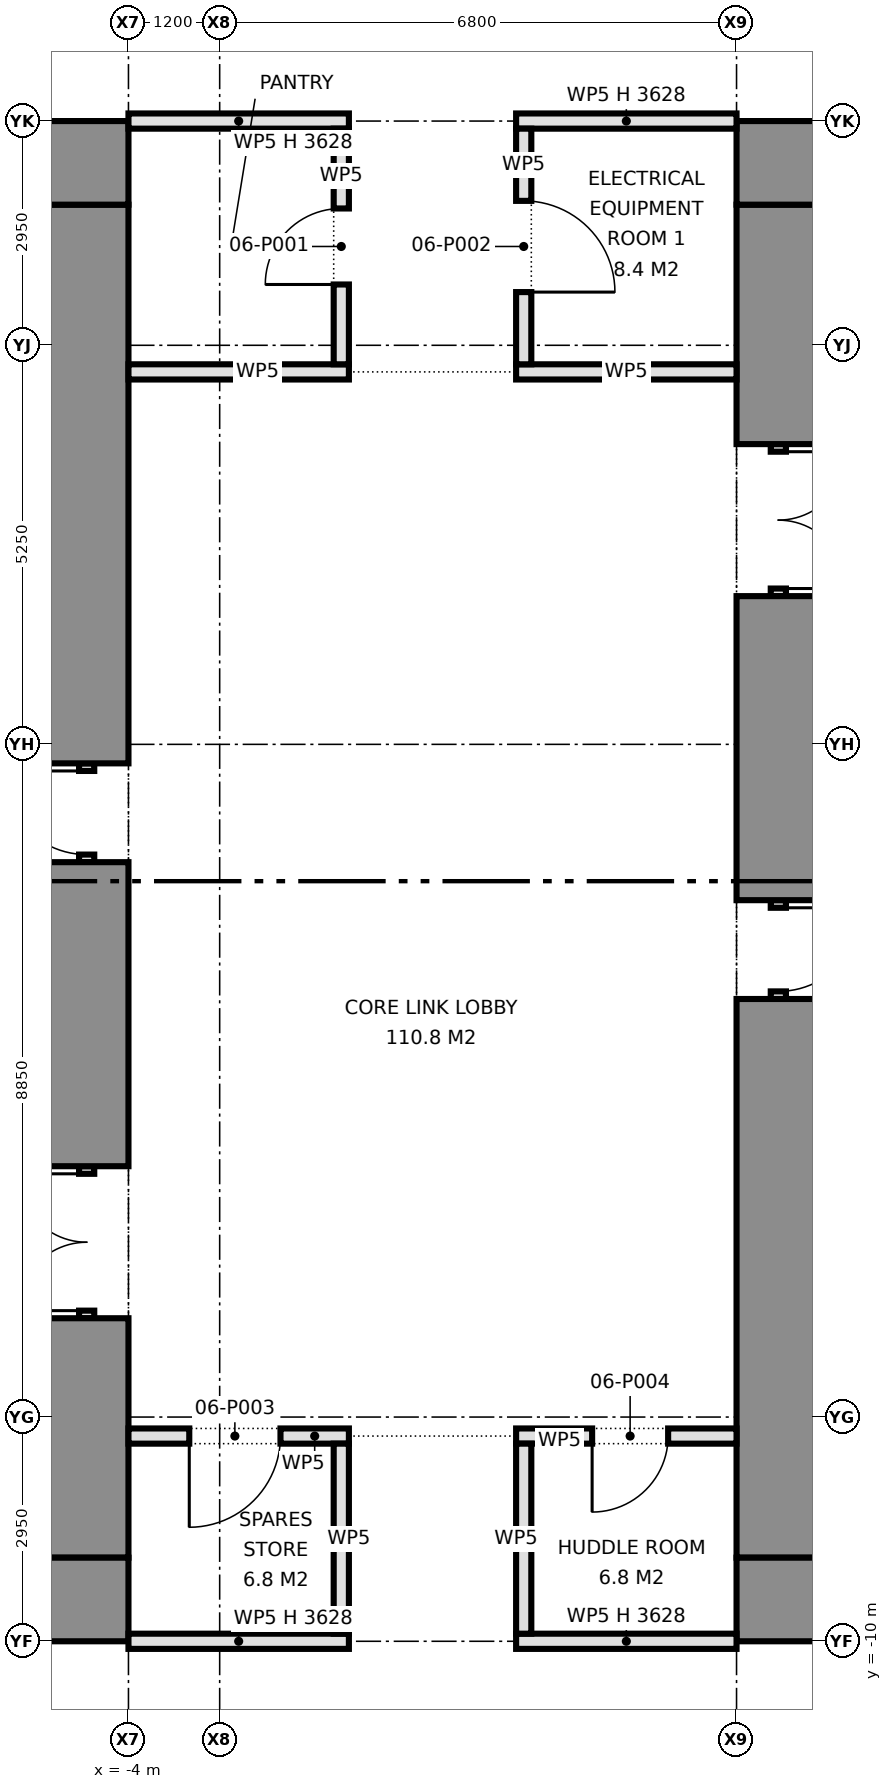
"""IFC4 building model, lengths in metres.
Left out: names, types, materials, properties, quantities, classifications, styles, units other than length and angle.
Written with IfcOpenShell. Run it as: python <this file> out.ifc"""

import sys

from ifc_helpers import new_model, si_unit, direction, frame, frame_2d, origin, place, context, subcontext, project, spatial, rectangle, extrude, element, fill, save


model = new_model("IFC4")
c1 = context("Model", 3, precision=1e-05, world=origin(), true_north=direction((0.0, 1.0)))
c2 = subcontext(c1, "Body", "Model", "MODEL_VIEW")
j1 = project(units=[si_unit("LENGTHUNIT", "METRE"), si_unit("PLANEANGLEUNIT", "RADIAN")], contexts=[c1])
p1 = place(None, origin())
s1 = spatial("IfcSite", under=j1, at=p1, CompositionType="ELEMENT")
p2 = place(p1, origin())
s2 = spatial("IfcBuilding", under=s1, at=p2, CompositionType="ELEMENT")
p3 = place(p2, frame((0.0, 0.0, 25.7)))
s3 = spatial("IfcBuildingStorey", under=s2, at=p3, CompositionType="ELEMENT", Elevation=25.7)
for number, where, z_axis, x_axis in (
    (1, (-15.0, -9.45, 0.0), (0.0, 0.0, 1.0), (1.0, 0.0, 0.0)),
    (2, (-15.0, 9.45, 0.0), (0.0, 0.0, 1.0), (1.0, 0.0, 0.0)),
):
    element("IfcWall", number, at=place(p3, frame(where, z_axis=z_axis, x_axis=x_axis)), inside=s3, PredefinedType="SHEAR", context=c2, shape_type="SweptSolid", body=[
        extrude(rectangle(XDim=11.0, YDim=1.1, at=frame_2d((5.5, 0.0))), origin(), (0.0, 0.0, 1.0), 4.575),
    ])
p4 = place(p3, frame((-4.55, -8.9, 0.0), z_axis=(0.0, 0.0, 1.0), x_axis=(0.0, 1.0, 0.0)))
e3 = element("IfcWall", 3, at=p4, inside=s3, PredefinedType="SHEAR", context=c2, shape_type="SweptSolid", body=[
    extrude(rectangle(XDim=3.15, YDim=1.1, at=frame_2d((1.575, 0.0))), origin(), (0.0, 0.0, 1.0), 4.575),
])
p5 = place(p3, frame((-4.55, -5.75, 0.0), z_axis=(0.0, 0.0, 1.0), x_axis=(0.0, 1.0, 0.0)))
e4 = element("IfcWall", 4, at=p5, inside=s3, PredefinedType="PARTITIONING", context=c2, shape_type="SweptSolid", body=[
    extrude(rectangle(XDim=2.0, YDim=0.2, at=frame_2d((1.0, 0.0))), origin(), (0.0, 0.0, 1.0), 2.4),
])
p6 = place(p5, frame((0.1, 0.0, 0.0)))
e5 = element("IfcOpeningElement", 5, at=p6, cuts=e4, PredefinedType="OPENING", context=c2, shape_type="SweptSolid", body=[
    extrude(rectangle(XDim=1.8, YDim=2.1, at=frame_2d((0.9, 1.05))), frame((0.0, 0.11, 0.0), z_axis=(0.0, -1.0, 0.0), x_axis=(1.0, 0.0, 0.0)), (0.0, 0.0, 1.0), 0.22),
])
p7 = place(p3, frame((-4.55, -3.75, 0.0), z_axis=(0.0, 0.0, 1.0), x_axis=(0.0, 1.0, 0.0)))
e6 = element("IfcWall", 6, at=p7, inside=s3, PredefinedType="SHEAR", context=c2, shape_type="SweptSolid", body=[
    extrude(rectangle(XDim=4.0, YDim=1.1, at=frame_2d((2.0, 0.0))), origin(), (0.0, 0.0, 1.0), 4.575),
])
p8 = place(p3, frame((-4.55, 0.25, 0.0), z_axis=(0.0, 0.0, 1.0), x_axis=(0.0, 1.0, 0.0)))
e7 = element("IfcWall", 7, at=p8, inside=s3, PredefinedType="PARTITIONING", context=c2, shape_type="SweptSolid", body=[
    extrude(rectangle(XDim=1.3, YDim=0.2, at=frame_2d((0.65, 0.0))), origin(), (0.0, 0.0, 1.0), 2.4),
])
p9 = place(p8, frame((0.1, 0.0, 0.0)))
e8 = element("IfcOpeningElement", 8, at=p9, cuts=e7, PredefinedType="OPENING", context=c2, shape_type="SweptSolid", body=[
    extrude(rectangle(XDim=1.1, YDim=2.1, at=frame_2d((0.55, 1.05))), frame((0.0, 0.11, 0.0), z_axis=(0.0, -1.0, 0.0), x_axis=(1.0, 0.0, 0.0)), (0.0, 0.0, 1.0), 0.22),
])
p10 = place(p3, frame((-4.55, 1.55, 0.0), z_axis=(0.0, 0.0, 1.0), x_axis=(0.0, 1.0, 0.0)))
e9 = element("IfcWall", 9, at=p10, inside=s3, PredefinedType="SHEAR", context=c2, shape_type="SweptSolid", body=[
    extrude(rectangle(XDim=7.35, YDim=1.1, at=frame_2d((3.675, 0.0))), origin(), (0.0, 0.0, 1.0), 4.575),
])
for number, where, z_axis, x_axis in (
    (10, (15.0, 9.45, 0.0), (0.0, 0.0, 1.0), (-1.0, 0.0, 0.0)),
    (11, (15.0, -9.45, 0.0), (0.0, 0.0, 1.0), (-1.0, 0.0, 0.0)),
):
    element("IfcWall", number, at=place(p3, frame(where, z_axis=z_axis, x_axis=x_axis)), inside=s3, PredefinedType="SHEAR", context=c2, shape_type="SweptSolid", body=[
        extrude(rectangle(XDim=11.0, YDim=1.1, at=frame_2d((5.5, 0.0))), origin(), (0.0, 0.0, 1.0), 4.575),
    ])
p11 = place(p3, frame((4.55, 8.9, 0.0), z_axis=(0.0, 0.0, 1.0), x_axis=(0.0, -1.0, 0.0)))
e12 = element("IfcWall", 12, at=p11, inside=s3, PredefinedType="SHEAR", context=c2, shape_type="SweptSolid", body=[
    extrude(rectangle(XDim=3.15, YDim=1.1, at=frame_2d((1.575, 0.0))), origin(), (0.0, 0.0, 1.0), 4.575),
])
p12 = place(p3, frame((4.55, 5.75, 0.0), z_axis=(0.0, 0.0, 1.0), x_axis=(0.0, -1.0, 0.0)))
e13 = element("IfcWall", 13, at=p12, inside=s3, PredefinedType="PARTITIONING", context=c2, shape_type="SweptSolid", body=[
    extrude(rectangle(XDim=2.0, YDim=0.2, at=frame_2d((1.0, 0.0))), origin(), (0.0, 0.0, 1.0), 2.4),
])
p13 = place(p12, frame((0.1, 0.0, 0.0)))
e14 = element("IfcOpeningElement", 14, at=p13, cuts=e13, PredefinedType="OPENING", context=c2, shape_type="SweptSolid", body=[
    extrude(rectangle(XDim=1.8, YDim=2.1, at=frame_2d((0.9, 1.05))), frame((0.0, 0.11, 0.0), z_axis=(0.0, -1.0, 0.0), x_axis=(1.0, 0.0, 0.0)), (0.0, 0.0, 1.0), 0.22),
])
p14 = place(p3, frame((4.55, 3.75, 0.0), z_axis=(0.0, 0.0, 1.0), x_axis=(0.0, -1.0, 0.0)))
e15 = element("IfcWall", 15, at=p14, inside=s3, PredefinedType="SHEAR", context=c2, shape_type="SweptSolid", body=[
    extrude(rectangle(XDim=4.0, YDim=1.1, at=frame_2d((2.0, 0.0))), origin(), (0.0, 0.0, 1.0), 4.575),
])
p15 = place(p3, frame((4.55, -0.25, 0.0), z_axis=(0.0, 0.0, 1.0), x_axis=(0.0, -1.0, 0.0)))
e16 = element("IfcWall", 16, at=p15, inside=s3, PredefinedType="PARTITIONING", context=c2, shape_type="SweptSolid", body=[
    extrude(rectangle(XDim=1.3, YDim=0.2, at=frame_2d((0.65, 0.0))), origin(), (0.0, 0.0, 1.0), 2.4),
])
p16 = place(p15, frame((0.1, 0.0, 0.0)))
e17 = element("IfcOpeningElement", 17, at=p16, cuts=e16, PredefinedType="OPENING", context=c2, shape_type="SweptSolid", body=[
    extrude(rectangle(XDim=1.1, YDim=2.1, at=frame_2d((0.55, 1.05))), frame((0.0, 0.11, 0.0), z_axis=(0.0, -1.0, 0.0), x_axis=(1.0, 0.0, 0.0)), (0.0, 0.0, 1.0), 0.22),
])
p17 = place(p3, frame((4.55, -1.55, 0.0), z_axis=(0.0, 0.0, 1.0), x_axis=(0.0, -1.0, 0.0)))
e18 = element("IfcWall", 18, at=p17, inside=s3, PredefinedType="SHEAR", context=c2, shape_type="SweptSolid", body=[
    extrude(rectangle(XDim=7.35, YDim=1.1, at=frame_2d((3.675, 0.0))), origin(), (0.0, 0.0, 1.0), 4.575),
])
for number, where, z_axis, x_axis in (
    (19, (-4.0, -10.0, 0.0), (0.0, 0.0, 1.0), (1.0, 0.0, 0.0)),
    (20, (1.1, -10.0, 0.0), (0.0, 0.0, 1.0), (1.0, 0.0, 0.0)),
):
    element("IfcWall", number, at=place(p3, frame(where, z_axis=z_axis, x_axis=x_axis)), inside=s3, PredefinedType="PARTITIONING", context=c2, shape_type="SweptSolid", body=[
        extrude(rectangle(XDim=2.9, YDim=0.2, at=frame_2d((1.45, 0.0))), origin(), (0.0, 0.0, 1.0), 3.628),
    ])
p18 = place(p3, frame((-4.0, -7.3, 0.0), z_axis=(0.0, 0.0, 1.0), x_axis=(1.0, 0.0, 0.0)))
e21 = element("IfcWall", 21, at=p18, inside=s3, PredefinedType="PARTITIONING", context=c2, shape_type="SweptSolid", body=[
    extrude(rectangle(XDim=2.9, YDim=0.2, at=frame_2d((1.45, 0.0))), origin(), (0.0, 0.0, 1.0), 4.575),
])
p19 = place(p18, frame((0.8, 0.0, 0.0)))
e22 = element("IfcOpeningElement", 22, at=p19, cuts=e21, PredefinedType="OPENING", context=c2, shape_type="SweptSolid", body=[
    extrude(rectangle(XDim=1.2, YDim=2.1, at=frame_2d((0.6, 1.05))), frame((0.0, 0.11, 0.0), z_axis=(0.0, -1.0, 0.0), x_axis=(1.0, 0.0, 0.0)), (0.0, 0.0, 1.0), 0.22),
])
p20 = place(p3, frame((1.1, -7.3, 0.0), z_axis=(0.0, 0.0, 1.0), x_axis=(1.0, 0.0, 0.0)))
e23 = element("IfcWall", 23, at=p20, inside=s3, PredefinedType="PARTITIONING", context=c2, shape_type="SweptSolid", body=[
    extrude(rectangle(XDim=2.9, YDim=0.2, at=frame_2d((1.45, 0.0))), origin(), (0.0, 0.0, 1.0), 4.575),
])
p21 = place(p20, frame((1.0, 0.0, 0.0)))
e24 = element("IfcOpeningElement", 24, at=p21, cuts=e23, PredefinedType="OPENING", context=c2, shape_type="SweptSolid", body=[
    extrude(rectangle(XDim=1.0, YDim=2.1, at=frame_2d((0.5, 1.05))), frame((0.0, 0.11, 0.0), z_axis=(0.0, -1.0, 0.0), x_axis=(1.0, 0.0, 0.0)), (0.0, 0.0, 1.0), 0.22),
])
for number, where, z_axis, x_axis in (
    (25, (-4.0, 6.7, 0.0), (0.0, 0.0, 1.0), (1.0, 0.0, 0.0)),
    (26, (1.1, 6.7, 0.0), (0.0, 0.0, 1.0), (1.0, 0.0, 0.0)),
):
    element("IfcWall", number, at=place(p3, frame(where, z_axis=z_axis, x_axis=x_axis)), inside=s3, PredefinedType="PARTITIONING", context=c2, shape_type="SweptSolid", body=[
        extrude(rectangle(XDim=2.9, YDim=0.2, at=frame_2d((1.45, 0.0))), origin(), (0.0, 0.0, 1.0), 4.575),
    ])
for number, where, z_axis, x_axis in (
    (27, (-4.0, 10.0, 0.0), (0.0, 0.0, 1.0), (1.0, 0.0, 0.0)),
    (28, (1.1, 10.0, 0.0), (0.0, 0.0, 1.0), (1.0, 0.0, 0.0)),
):
    element("IfcWall", number, at=place(p3, frame(where, z_axis=z_axis, x_axis=x_axis)), inside=s3, PredefinedType="PARTITIONING", context=c2, shape_type="SweptSolid", body=[
        extrude(rectangle(XDim=2.9, YDim=0.2, at=frame_2d((1.45, 0.0))), origin(), (0.0, 0.0, 1.0), 3.628),
    ])
p22 = place(p3, frame((1.2, -9.9, 0.0), z_axis=(0.0, 0.0, 1.0), x_axis=(0.0, 1.0, 0.0)))
e29 = element("IfcWall", 29, at=p22, inside=s3, PredefinedType="PARTITIONING", context=c2, shape_type="SweptSolid", body=[
    extrude(rectangle(XDim=2.5, YDim=0.2, at=frame_2d((1.25, 0.0))), origin(), (0.0, 0.0, 1.0), 4.575),
])
p23 = place(p3, frame((1.2, 6.8, 0.0), z_axis=(0.0, 0.0, 1.0), x_axis=(0.0, 1.0, 0.0)))
e30 = element("IfcWall", 30, at=p23, inside=s3, PredefinedType="PARTITIONING", context=c2, shape_type="SweptSolid", body=[
    extrude(rectangle(XDim=3.1, YDim=0.2, at=frame_2d((1.55, 0.0))), origin(), (0.0, 0.0, 1.0), 4.575),
])
p24 = place(p23, frame((0.95, 0.0, 0.0)))
e31 = element("IfcOpeningElement", 31, at=p24, cuts=e30, PredefinedType="OPENING", context=c2, shape_type="SweptSolid", body=[
    extrude(rectangle(XDim=1.2, YDim=2.1, at=frame_2d((0.6, 1.05))), frame((0.0, 0.11, 0.0), z_axis=(0.0, -1.0, 0.0), x_axis=(1.0, 0.0, 0.0)), (0.0, 0.0, 1.0), 0.22),
])
p25 = place(p3, frame((-1.2, -9.9, 0.0), z_axis=(0.0, 0.0, 1.0), x_axis=(0.0, 1.0, 0.0)))
e32 = element("IfcWall", 32, at=p25, inside=s3, PredefinedType="PARTITIONING", context=c2, shape_type="SweptSolid", body=[
    extrude(rectangle(XDim=2.5, YDim=0.2, at=frame_2d((1.25, 0.0))), origin(), (0.0, 0.0, 1.0), 4.575),
])
p26 = place(p3, frame((-1.2, 6.8, 0.0), z_axis=(0.0, 0.0, 1.0), x_axis=(0.0, 1.0, 0.0)))
e33 = element("IfcWall", 33, at=p26, inside=s3, PredefinedType="PARTITIONING", context=c2, shape_type="SweptSolid", body=[
    extrude(rectangle(XDim=3.1, YDim=0.2, at=frame_2d((1.55, 0.0))), origin(), (0.0, 0.0, 1.0), 4.575),
])
p27 = place(p26, frame((1.05, 0.0, 0.0)))
e34 = element("IfcOpeningElement", 34, at=p27, cuts=e33, PredefinedType="OPENING", context=c2, shape_type="SweptSolid", body=[
    extrude(rectangle(XDim=1.0, YDim=2.1, at=frame_2d((0.5, 1.05))), frame((0.0, 0.11, 0.0), z_axis=(0.0, -1.0, 0.0), x_axis=(1.0, 0.0, 0.0)), (0.0, 0.0, 1.0), 0.22),
])
p28 = place(p6, origin())
e35 = element("IfcDoor", 35, at=p28, inside=s3, OperationType="DOUBLE_DOOR_SINGLE_SWING", PredefinedType="DOOR", context=c2, shape_type="SweptSolid", body=[
    extrude(rectangle(XDim=1.8, YDim=2.1, at=frame_2d((0.9, 1.05))), frame((0.0, 0.025, 0.0), z_axis=(0.0, -1.0, 0.0), x_axis=(1.0, 0.0, 0.0)), (0.0, 0.0, 1.0), 0.05),
])
fill(e5, e35)
p29 = place(p9, origin())
e36 = element("IfcDoor", 36, at=p29, inside=s3, OperationType="SINGLE_SWING_RIGHT", PredefinedType="DOOR", context=c2, shape_type="SweptSolid", body=[
    extrude(rectangle(XDim=1.1, YDim=2.1, at=frame_2d((0.55, 1.05))), frame((0.0, 0.025, 0.0), z_axis=(0.0, -1.0, 0.0), x_axis=(1.0, 0.0, 0.0)), (0.0, 0.0, 1.0), 0.05),
])
fill(e8, e36)
p30 = place(p13, origin())
e37 = element("IfcDoor", 37, at=p30, inside=s3, OperationType="DOUBLE_DOOR_SINGLE_SWING", PredefinedType="DOOR", context=c2, shape_type="SweptSolid", body=[
    extrude(rectangle(XDim=1.8, YDim=2.1, at=frame_2d((0.9, 1.05))), frame((0.0, 0.025, 0.0), z_axis=(0.0, -1.0, 0.0), x_axis=(1.0, 0.0, 0.0)), (0.0, 0.0, 1.0), 0.05),
])
fill(e14, e37)
p31 = place(p16, origin())
e38 = element("IfcDoor", 38, at=p31, inside=s3, OperationType="SINGLE_SWING_LEFT", PredefinedType="DOOR", context=c2, shape_type="SweptSolid", body=[
    extrude(rectangle(XDim=1.1, YDim=2.1, at=frame_2d((0.55, 1.05))), frame((0.0, 0.025, 0.0), z_axis=(0.0, -1.0, 0.0), x_axis=(1.0, 0.0, 0.0)), (0.0, 0.0, 1.0), 0.05),
])
fill(e17, e38)
p32 = place(p27, origin())
e39 = element("IfcDoor", 39, at=p32, inside=s3, OperationType="SINGLE_SWING_LEFT", PredefinedType="DOOR", context=c2, shape_type="SweptSolid", body=[
    extrude(rectangle(XDim=1.0, YDim=2.1, at=frame_2d((0.5, 1.05))), frame((0.0, 0.025, 0.0), z_axis=(0.0, -1.0, 0.0), x_axis=(1.0, 0.0, 0.0)), (0.0, 0.0, 1.0), 0.05),
])
fill(e34, e39)
p33 = place(p24, frame((1.2, 0.0, 0.0), z_axis=(0.0, 0.0, 1.0), x_axis=(-1.0, 0.0, 0.0)))
e40 = element("IfcDoor", 40, at=p33, inside=s3, OperationType="SINGLE_SWING_RIGHT", PredefinedType="DOOR", context=c2, shape_type="SweptSolid", body=[
    extrude(rectangle(XDim=1.2, YDim=2.1, at=frame_2d((0.6, 1.05))), frame((0.0, 0.025, 0.0), z_axis=(0.0, -1.0, 0.0), x_axis=(1.0, 0.0, 0.0)), (0.0, 0.0, 1.0), 0.05),
])
fill(e31, e40)
p34 = place(p19, frame((1.2, 0.0, 0.0), z_axis=(0.0, 0.0, 1.0), x_axis=(-1.0, 0.0, 0.0)))
e41 = element("IfcDoor", 41, at=p34, inside=s3, OperationType="SINGLE_SWING_RIGHT", PredefinedType="DOOR", context=c2, shape_type="SweptSolid", body=[
    extrude(rectangle(XDim=1.2, YDim=2.1, at=frame_2d((0.6, 1.05))), frame((0.0, 0.025, 0.0), z_axis=(0.0, -1.0, 0.0), x_axis=(1.0, 0.0, 0.0)), (0.0, 0.0, 1.0), 0.05),
])
fill(e22, e41)
p35 = place(p21, frame((1.0, 0.0, 0.0), z_axis=(0.0, 0.0, 1.0), x_axis=(-1.0, 0.0, 0.0)))
e42 = element("IfcDoor", 42, at=p35, inside=s3, OperationType="SINGLE_SWING_RIGHT", PredefinedType="DOOR", context=c2, shape_type="SweptSolid", body=[
    extrude(rectangle(XDim=1.0, YDim=2.1, at=frame_2d((0.5, 1.05))), frame((0.0, 0.025, 0.0), z_axis=(0.0, -1.0, 0.0), x_axis=(1.0, 0.0, 0.0)), (0.0, 0.0, 1.0), 0.05),
])
fill(e24, e42)
save(model, sys.argv[1])
